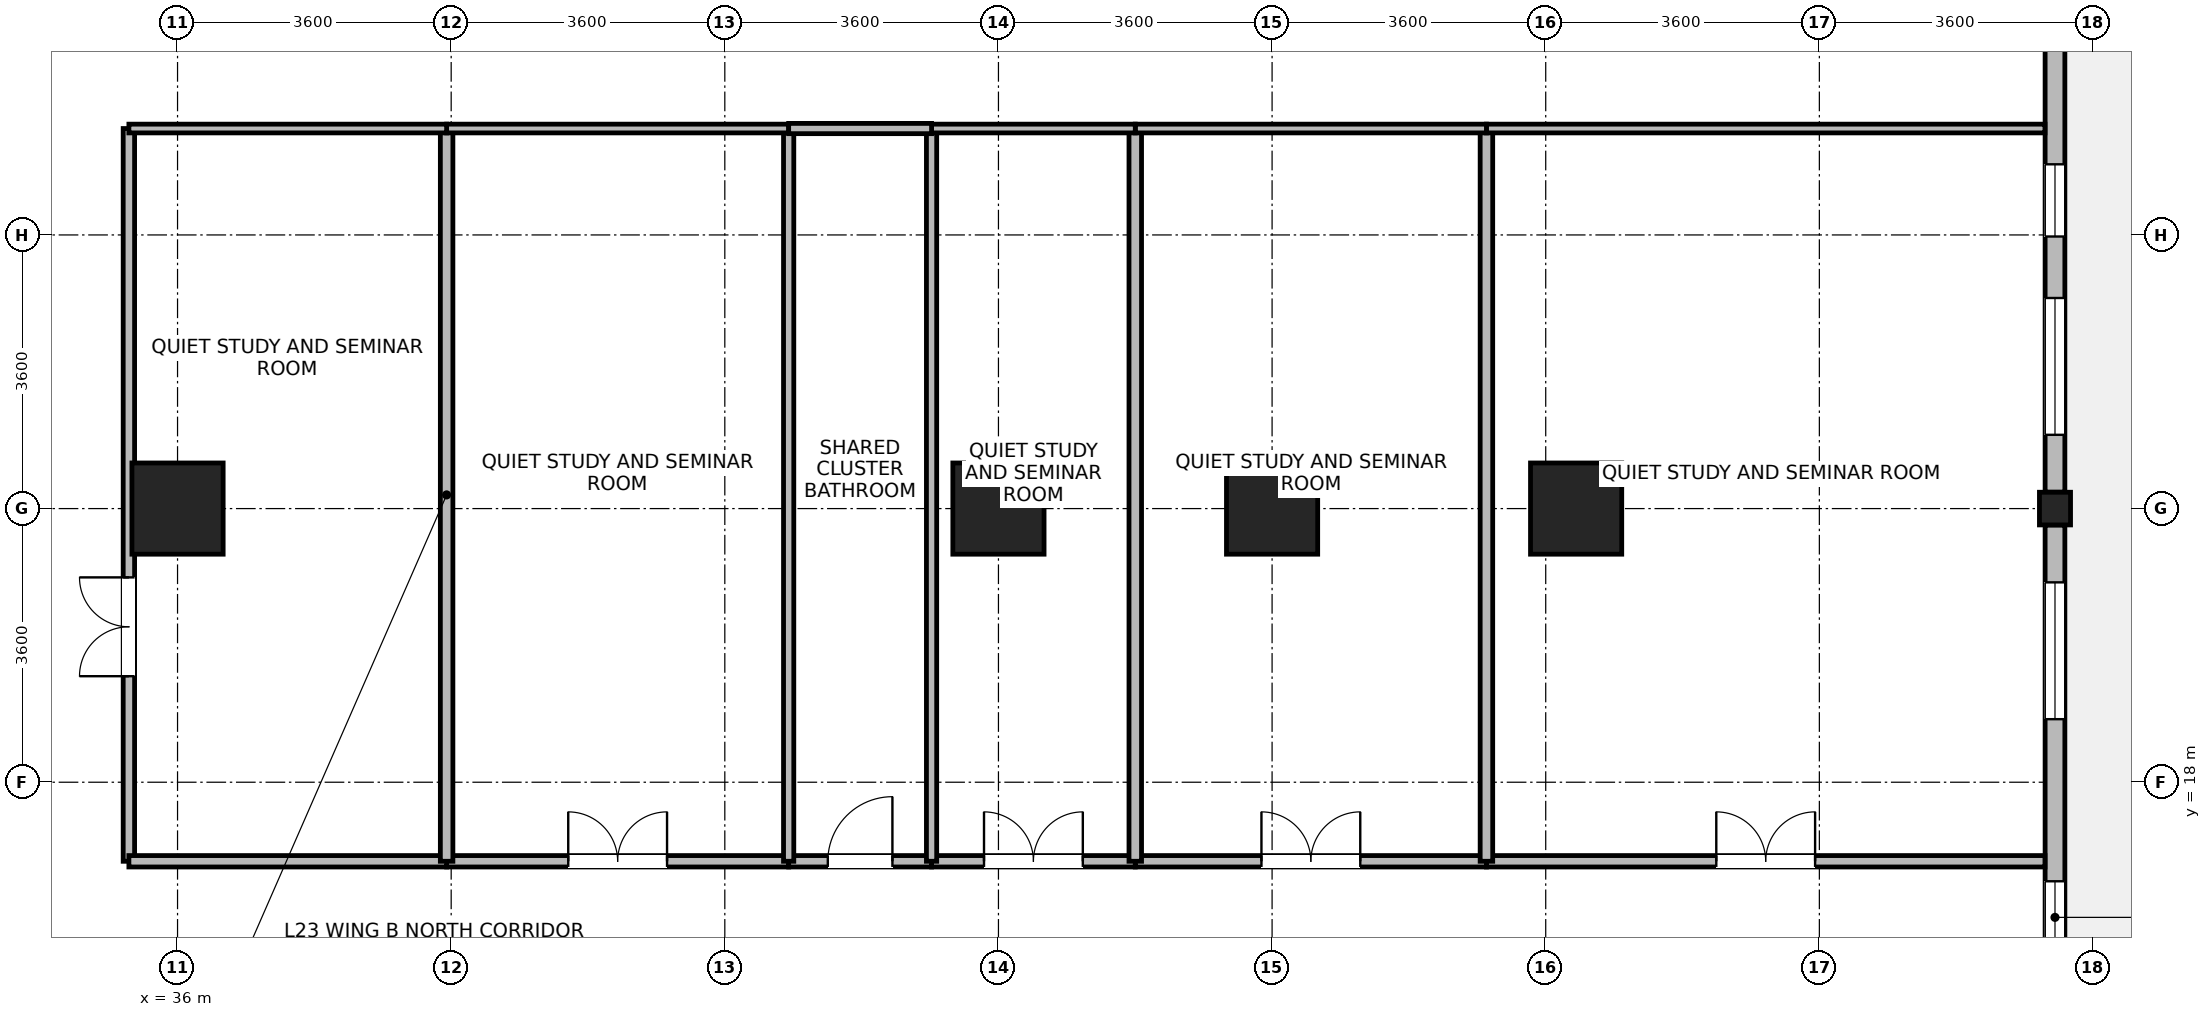
"""IFC4 building model, lengths in metres.
Left out: names, types, materials, properties, quantities, classifications, styles, units other than length and angle.
Written with IfcOpenShell. Run it as: python <this file> out.ifc"""

import sys

from ifc_helpers import new_model, si_unit, direction, frame, frame_2d, origin, origin_2d, place, context, subcontext, project, spatial, rectangle, i_section, extrude, source, transform, mapped, element, fill, save


model = new_model("IFC4")
c1 = context("Model", 3, precision=1e-05, world=origin(), true_north=direction((0.0, 1.0)))
c2 = subcontext(c1, "Body", "Model", "MODEL_VIEW")
j1 = project(units=[si_unit("LENGTHUNIT", "METRE"), si_unit("PLANEANGLEUNIT", "RADIAN")], contexts=[c1])
p1 = place(None, origin())
s1 = spatial("IfcSite", under=j1, at=p1, CompositionType="ELEMENT")
p2 = place(p1, origin())
s2 = spatial("IfcBuilding", under=s1, at=p2, CompositionType="ELEMENT")
p3 = place(p2, frame((0.0, 0.0, 93.4)))
s3 = spatial("IfcBuildingStorey", under=s2, at=p3, CompositionType="ELEMENT", Elevation=93.4)
m1 = source(origin(), c2, "Body", "SweptSolid", [
    extrude(rectangle(XDim=1.2, YDim=1.2, at=origin_2d()), origin(), (0.0, 0.0, 1.0), 3.7),
])
for number, where, z_axis, x_axis in (
    (1, (36.0, 21.6, 0.0), (0.0, 0.0, 1.0), (1.0, 0.0, 0.0)),
    (2, (46.8, 21.6, 0.0), (0.0, 0.0, 1.0), (1.0, 0.0, 0.0)),
    (3, (50.4, 21.6, 0.0), (0.0, 0.0, 1.0), (1.0, 0.0, 0.0)),
    (4, (54.4, 21.6, 0.0), (0.0, 0.0, 1.0), (1.0, 0.0, 0.0)),
):
    element("IfcColumn", number, at=place(p3, frame(where, z_axis=z_axis, x_axis=x_axis)), inside=s3, PredefinedType="COLUMN", context=c2, shape_type="MappedRepresentation", body=[
        mapped(m1, transform((0.0, 0.0, 0.0), x_axis=(1.0, 0.0, 0.0), y_axis=(0.0, 1.0, 0.0), z_axis=(0.0, 0.0, 1.0), scale=1.0)),
    ])
m2 = source(origin(), c2, "Body", "SweptSolid", [
    extrude(i_section(OverallWidth=0.409, OverallDepth=0.43, WebThickness=0.024, FlangeThickness=0.033, FilletRadius=0.015, at=origin_2d()), origin(), (0.0, 0.0, 1.0), 3.7),
])
p4 = place(p3, frame((60.7, 21.6, 0.0), z_axis=(0.0, 0.0, 1.0), x_axis=(1.0, 0.0, 0.0)))
e5 = element("IfcColumn", 5, at=p4, inside=s3, PredefinedType="COLUMN", context=c2, shape_type="MappedRepresentation", body=[
    mapped(m2, transform((0.0, 0.0, 0.0), x_axis=(1.0, 0.0, 0.0), y_axis=(0.0, 1.0, 0.0), z_axis=(0.0, 0.0, 1.0), scale=1.0)),
])
p5 = place(p3, frame((60.7, 21.384, 0.0), z_axis=(0.0, 0.0, 1.0), x_axis=(0.0, -1.0, 0.0)))
e6 = element("IfcWall", 6, at=p5, inside=s3, PredefinedType="STANDARD", context=c2, shape_type="SweptSolid", body=[
    extrude(rectangle(XDim=6.618, YDim=0.26, at=frame_2d((3.309, 0.0))), origin(), (0.0, 0.0, 1.0), 2.93),
])
p6 = place(p5, frame((0.754, 0.0, 0.85)))
e7 = element("IfcOpeningElement", 7, at=p6, cuts=e6, PredefinedType="OPENING", context=c2, shape_type="SweptSolid", body=[
    extrude(rectangle(XDim=1.8, YDim=1.85, at=frame_2d((0.9, 0.925))), frame((0.0, 0.14, 0.0), z_axis=(0.0, -1.0, 0.0), x_axis=(1.0, 0.0, 0.0)), (0.0, 0.0, 1.0), 0.28),
])
p7 = place(p5, frame((4.687, 0.0, 0.85)))
e8 = element("IfcOpeningElement", 8, at=p7, cuts=e6, PredefinedType="OPENING", context=c2, shape_type="SweptSolid", body=[
    extrude(rectangle(XDim=0.95, YDim=1.75, at=frame_2d((0.475, 0.875))), frame((0.0, 0.14, 0.0), z_axis=(0.0, -1.0, 0.0), x_axis=(1.0, 0.0, 0.0)), (0.0, 0.0, 1.0), 0.28),
])
p8 = place(p3, frame((60.7, 28.434, 0.0), z_axis=(0.0, 0.0, 1.0), x_axis=(0.0, -1.0, 0.0)))
e9 = element("IfcWall", 9, at=p8, inside=s3, PredefinedType="STANDARD", context=c2, shape_type="SweptSolid", body=[
    extrude(rectangle(XDim=6.618, YDim=0.26, at=frame_2d((3.309, 0.0))), origin(), (0.0, 0.0, 1.0), 2.93),
])
p9 = place(p8, frame((4.063, 0.0, 0.85)))
e10 = element("IfcOpeningElement", 10, at=p9, cuts=e9, PredefinedType="OPENING", context=c2, shape_type="SweptSolid", body=[
    extrude(rectangle(XDim=1.8, YDim=1.85, at=frame_2d((0.9, 0.925))), frame((0.0, 0.14, 0.0), z_axis=(0.0, -1.0, 0.0), x_axis=(1.0, 0.0, 0.0)), (0.0, 0.0, 1.0), 0.28),
])
p10 = place(p8, frame((2.305, 0.0, 0.85)))
e11 = element("IfcOpeningElement", 11, at=p10, cuts=e9, PredefinedType="OPENING", context=c2, shape_type="SweptSolid", body=[
    extrude(rectangle(XDim=0.95, YDim=1.75, at=frame_2d((0.475, 0.875))), frame((0.0, 0.14, 0.0), z_axis=(0.0, -1.0, 0.0), x_axis=(1.0, 0.0, 0.0)), (0.0, 0.0, 1.0), 0.28),
])
p11 = place(p3, frame((35.36, 16.96, 0.0), z_axis=(0.0, 0.0, 1.0), x_axis=(0.0, 1.0, 0.0)))
e12 = element("IfcWall", 12, at=p11, inside=s3, PredefinedType="PARTITIONING", context=c2, shape_type="SweptSolid", body=[
    extrude(rectangle(XDim=9.64, YDim=0.15, at=frame_2d((4.82, 0.0))), origin(), (0.0, 0.0, 1.0), 3.43),
])
p12 = place(p11, frame((2.435, 0.0, 0.0)))
e13 = element("IfcOpeningElement", 13, at=p12, cuts=e12, PredefinedType="OPENING", context=c2, shape_type="SweptSolid", body=[
    extrude(rectangle(XDim=1.3, YDim=2.12, at=frame_2d((0.65, 1.06))), frame((0.0, 0.085, 0.0), z_axis=(0.0, -1.0, 0.0), x_axis=(1.0, 0.0, 0.0)), (0.0, 0.0, 1.0), 0.17),
])
p13 = place(p3, frame((53.22, 16.96, 0.0), z_axis=(0.0, 0.0, 1.0), x_axis=(1.0, 0.0, 0.0)))
e14 = element("IfcWall", 14, at=p13, inside=s3, PredefinedType="PARTITIONING", context=c2, shape_type="SweptSolid", body=[
    extrude(rectangle(XDim=7.348, YDim=0.15, at=frame_2d((3.674, 0.0))), origin(), (0.0, 0.0, 1.0), 3.43),
])
p14 = place(p13, frame((3.024, 0.0, 0.0)))
e15 = element("IfcOpeningElement", 15, at=p14, cuts=e14, PredefinedType="OPENING", context=c2, shape_type="SweptSolid", body=[
    extrude(rectangle(XDim=1.3, YDim=2.12, at=frame_2d((0.65, 1.06))), frame((0.0, 0.085, 0.0), z_axis=(0.0, -1.0, 0.0), x_axis=(1.0, 0.0, 0.0)), (0.0, 0.0, 1.0), 0.17),
])
p15 = place(p3, frame((48.6, 16.96, 0.0), z_axis=(0.0, 0.0, 1.0), x_axis=(1.0, 0.0, 0.0)))
e16 = element("IfcWall", 16, at=p15, inside=s3, PredefinedType="PARTITIONING", context=c2, shape_type="SweptSolid", body=[
    extrude(rectangle(XDim=4.62, YDim=0.15, at=frame_2d((2.31, 0.0))), origin(), (0.0, 0.0, 1.0), 3.43),
])
p16 = place(p15, frame((1.66, 0.0, 0.0)))
e17 = element("IfcOpeningElement", 17, at=p16, cuts=e16, PredefinedType="OPENING", context=c2, shape_type="SweptSolid", body=[
    extrude(rectangle(XDim=1.3, YDim=2.12, at=frame_2d((0.65, 1.06))), frame((0.0, 0.085, 0.0), z_axis=(0.0, -1.0, 0.0), x_axis=(1.0, 0.0, 0.0)), (0.0, 0.0, 1.0), 0.17),
])
p17 = place(p3, frame((39.54, 16.96, 0.0), z_axis=(0.0, 0.0, 1.0), x_axis=(1.0, 0.0, 0.0)))
e18 = element("IfcWall", 18, at=p17, inside=s3, PredefinedType="PARTITIONING", context=c2, shape_type="SweptSolid", body=[
    extrude(rectangle(XDim=4.5, YDim=0.15, at=frame_2d((2.25, 0.0))), origin(), (0.0, 0.0, 1.0), 3.43),
])
p18 = place(p17, frame((1.6, 0.0, 0.0)))
e19 = element("IfcOpeningElement", 19, at=p18, cuts=e18, PredefinedType="OPENING", context=c2, shape_type="SweptSolid", body=[
    extrude(rectangle(XDim=1.3, YDim=2.12, at=frame_2d((0.65, 1.06))), frame((0.0, 0.085, 0.0), z_axis=(0.0, -1.0, 0.0), x_axis=(1.0, 0.0, 0.0)), (0.0, 0.0, 1.0), 0.17),
])
p19 = place(p3, frame((35.36, 16.96, 0.0), z_axis=(0.0, 0.0, 1.0), x_axis=(1.0, 0.0, 0.0)))
e20 = element("IfcWall", 20, at=p19, inside=s3, PredefinedType="PARTITIONING", context=c2, shape_type="SweptSolid", body=[
    extrude(rectangle(XDim=4.18, YDim=0.15, at=frame_2d((2.09, 0.0))), origin(), (0.0, 0.0, 1.0), 3.43),
])
p20 = place(p3, frame((45.92, 16.96, 0.0), z_axis=(0.0, 0.0, 1.0), x_axis=(1.0, 0.0, 0.0)))
e21 = element("IfcWall", 21, at=p20, inside=s3, PredefinedType="PARTITIONING", context=c2, shape_type="SweptSolid", body=[
    extrude(rectangle(XDim=2.68, YDim=0.15, at=frame_2d((1.34, 0.0))), origin(), (0.0, 0.0, 1.0), 3.43),
])
p21 = place(p20, frame((0.69, 0.0, 0.0)))
e22 = element("IfcOpeningElement", 22, at=p21, cuts=e21, PredefinedType="OPENING", context=c2, shape_type="SweptSolid", body=[
    extrude(rectangle(XDim=1.3, YDim=2.12, at=frame_2d((0.65, 1.06))), frame((0.0, 0.085, 0.0), z_axis=(0.0, -1.0, 0.0), x_axis=(1.0, 0.0, 0.0)), (0.0, 0.0, 1.0), 0.17),
])
p22 = place(p3, frame((44.04, 16.96, 0.0), z_axis=(0.0, 0.0, 1.0), x_axis=(1.0, 0.0, 0.0)))
e23 = element("IfcWall", 23, at=p22, inside=s3, PredefinedType="PARTITIONING", context=c2, shape_type="SweptSolid", body=[
    extrude(rectangle(XDim=1.88, YDim=0.15, at=frame_2d((0.94, 0.0))), origin(), (0.0, 0.0, 1.0), 3.43),
])
p23 = place(p22, frame((0.515, 0.0, 0.0)))
e24 = element("IfcOpeningElement", 24, at=p23, cuts=e23, PredefinedType="OPENING", context=c2, shape_type="SweptSolid", body=[
    extrude(rectangle(XDim=0.85, YDim=2.04, at=frame_2d((0.425, 1.02))), frame((0.0, 0.085, 0.0), z_axis=(0.0, -1.0, 0.0), x_axis=(1.0, 0.0, 0.0)), (0.0, 0.0, 1.0), 0.17),
])
p24 = place(p3, frame((39.54, 16.96, 0.0), z_axis=(0.0, 0.0, 1.0), x_axis=(0.0, 1.0, 0.0)))
e25 = element("IfcWall", 25, at=p24, inside=s3, PredefinedType="PARTITIONING", context=c2, shape_type="SweptSolid", body=[
    extrude(rectangle(XDim=9.64, YDim=0.165, at=frame_2d((4.82, 0.0))), origin(), (0.0, 0.0, 1.0), 3.43),
])
for number, where, z_axis, x_axis in (
    (26, (44.04, 16.96, 0.0), (0.0, 0.0, 1.0), (0.0, 1.0, 0.0)),
    (27, (45.92, 16.96, 0.0), (0.0, 0.0, 1.0), (0.0, 1.0, 0.0)),
):
    element("IfcWall", number, at=place(p3, frame(where, z_axis=z_axis, x_axis=x_axis)), inside=s3, PredefinedType="PARTITIONING", context=c2, shape_type="SweptSolid", body=[
        extrude(rectangle(XDim=9.64, YDim=0.135, at=frame_2d((4.82, 0.0))), origin(), (0.0, 0.0, 1.0), 3.43),
    ])
for number, where, z_axis, x_axis in (
    (28, (48.6, 16.96, 0.0), (0.0, 0.0, 1.0), (0.0, 1.0, 0.0)),
    (29, (53.22, 16.96, 0.0), (0.0, 0.0, 1.0), (0.0, 1.0, 0.0)),
):
    element("IfcWall", number, at=place(p3, frame(where, z_axis=z_axis, x_axis=x_axis)), inside=s3, PredefinedType="PARTITIONING", context=c2, shape_type="SweptSolid", body=[
        extrude(rectangle(XDim=9.64, YDim=0.165, at=frame_2d((4.82, 0.0))), origin(), (0.0, 0.0, 1.0), 3.43),
    ])
p25 = place(p3, frame((53.22, 26.6, 0.0), z_axis=(0.0, 0.0, 1.0), x_axis=(1.0, 0.0, 0.0)))
e30 = element("IfcWall", 30, at=p25, inside=s3, PredefinedType="PARTITIONING", context=c2, shape_type="SweptSolid", body=[
    extrude(rectangle(XDim=7.348, YDim=0.115, at=frame_2d((3.674, 0.0))), origin(), (0.0, 0.0, 1.0), 3.43),
])
p26 = place(p3, frame((48.6, 26.6, 0.0), z_axis=(0.0, 0.0, 1.0), x_axis=(1.0, 0.0, 0.0)))
e31 = element("IfcWall", 31, at=p26, inside=s3, PredefinedType="PARTITIONING", context=c2, shape_type="SweptSolid", body=[
    extrude(rectangle(XDim=4.62, YDim=0.115, at=frame_2d((2.31, 0.0))), origin(), (0.0, 0.0, 1.0), 3.43),
])
p27 = place(p3, frame((39.54, 26.6, 0.0), z_axis=(0.0, 0.0, 1.0), x_axis=(1.0, 0.0, 0.0)))
e32 = element("IfcWall", 32, at=p27, inside=s3, PredefinedType="PARTITIONING", context=c2, shape_type="SweptSolid", body=[
    extrude(rectangle(XDim=4.5, YDim=0.115, at=frame_2d((2.25, 0.0))), origin(), (0.0, 0.0, 1.0), 3.43),
])
p28 = place(p3, frame((35.36, 26.6, 0.0), z_axis=(0.0, 0.0, 1.0), x_axis=(1.0, 0.0, 0.0)))
e33 = element("IfcWall", 33, at=p28, inside=s3, PredefinedType="PARTITIONING", context=c2, shape_type="SweptSolid", body=[
    extrude(rectangle(XDim=4.18, YDim=0.115, at=frame_2d((2.09, 0.0))), origin(), (0.0, 0.0, 1.0), 3.43),
])
p29 = place(p3, frame((45.92, 26.6, 0.0), z_axis=(0.0, 0.0, 1.0), x_axis=(1.0, 0.0, 0.0)))
e34 = element("IfcWall", 34, at=p29, inside=s3, PredefinedType="PARTITIONING", context=c2, shape_type="SweptSolid", body=[
    extrude(rectangle(XDim=2.68, YDim=0.115, at=frame_2d((1.34, 0.0))), origin(), (0.0, 0.0, 1.0), 3.43),
])
p30 = place(p3, frame((44.04, 26.6, 0.0), z_axis=(0.0, 0.0, 1.0), x_axis=(1.0, 0.0, 0.0)))
e35 = element("IfcWall", 35, at=p30, inside=s3, PredefinedType="PARTITIONING", context=c2, shape_type="SweptSolid", body=[
    extrude(rectangle(XDim=1.88, YDim=0.135, at=frame_2d((0.94, 0.0))), origin(), (0.0, 0.0, 1.0), 3.43),
])
p31 = place(p6, origin())
e36 = element("IfcWindow", 36, at=p31, inside=s3, PartitioningType="SINGLE_PANEL", PredefinedType="WINDOW", context=c2, shape_type="SweptSolid", body=[
    extrude(rectangle(XDim=1.8, YDim=1.85, at=frame_2d((0.9, 0.925))), frame((0.0, 0.03, 0.0), z_axis=(0.0, -1.0, 0.0), x_axis=(1.0, 0.0, 0.0)), (0.0, 0.0, 1.0), 0.06),
])
fill(e7, e36)
p32 = place(p7, origin())
e37 = element("IfcWindow", 37, at=p32, inside=s3, PartitioningType="SINGLE_PANEL", PredefinedType="WINDOW", context=c2, shape_type="SweptSolid", body=[
    extrude(rectangle(XDim=0.95, YDim=1.75, at=frame_2d((0.475, 0.875))), frame((0.0, 0.03, 0.0), z_axis=(0.0, -1.0, 0.0), x_axis=(1.0, 0.0, 0.0)), (0.0, 0.0, 1.0), 0.06),
])
fill(e8, e37)
p33 = place(p9, origin())
e38 = element("IfcWindow", 38, at=p33, inside=s3, PartitioningType="SINGLE_PANEL", PredefinedType="WINDOW", context=c2, shape_type="SweptSolid", body=[
    extrude(rectangle(XDim=1.8, YDim=1.85, at=frame_2d((0.9, 0.925))), frame((0.0, 0.03, 0.0), z_axis=(0.0, -1.0, 0.0), x_axis=(1.0, 0.0, 0.0)), (0.0, 0.0, 1.0), 0.06),
])
fill(e10, e38)
p34 = place(p10, origin())
e39 = element("IfcWindow", 39, at=p34, inside=s3, PartitioningType="SINGLE_PANEL", PredefinedType="WINDOW", context=c2, shape_type="SweptSolid", body=[
    extrude(rectangle(XDim=0.95, YDim=1.75, at=frame_2d((0.475, 0.875))), frame((0.0, 0.03, 0.0), z_axis=(0.0, -1.0, 0.0), x_axis=(1.0, 0.0, 0.0)), (0.0, 0.0, 1.0), 0.06),
])
fill(e11, e39)
p35 = place(p12, origin())
e40 = element("IfcDoor", 40, at=p35, inside=s3, OperationType="DOUBLE_DOOR_SINGLE_SWING", PredefinedType="DOOR", context=c2, shape_type="SweptSolid", body=[
    extrude(rectangle(XDim=1.3, YDim=2.12, at=frame_2d((0.65, 1.06))), frame((0.0, 0.025, 0.0), z_axis=(0.0, -1.0, 0.0), x_axis=(1.0, 0.0, 0.0)), (0.0, 0.0, 1.0), 0.05),
])
fill(e13, e40)
p36 = place(p14, origin())
e41 = element("IfcDoor", 41, at=p36, inside=s3, OperationType="DOUBLE_DOOR_SINGLE_SWING", PredefinedType="DOOR", context=c2, shape_type="SweptSolid", body=[
    extrude(rectangle(XDim=1.3, YDim=2.12, at=frame_2d((0.65, 1.06))), frame((0.0, 0.025, 0.0), z_axis=(0.0, -1.0, 0.0), x_axis=(1.0, 0.0, 0.0)), (0.0, 0.0, 1.0), 0.05),
])
fill(e15, e41)
p37 = place(p16, origin())
e42 = element("IfcDoor", 42, at=p37, inside=s3, OperationType="DOUBLE_DOOR_SINGLE_SWING", PredefinedType="DOOR", context=c2, shape_type="SweptSolid", body=[
    extrude(rectangle(XDim=1.3, YDim=2.12, at=frame_2d((0.65, 1.06))), frame((0.0, 0.025, 0.0), z_axis=(0.0, -1.0, 0.0), x_axis=(1.0, 0.0, 0.0)), (0.0, 0.0, 1.0), 0.05),
])
fill(e17, e42)
p38 = place(p18, origin())
e43 = element("IfcDoor", 43, at=p38, inside=s3, OperationType="DOUBLE_DOOR_SINGLE_SWING", PredefinedType="DOOR", context=c2, shape_type="SweptSolid", body=[
    extrude(rectangle(XDim=1.3, YDim=2.12, at=frame_2d((0.65, 1.06))), frame((0.0, 0.025, 0.0), z_axis=(0.0, -1.0, 0.0), x_axis=(1.0, 0.0, 0.0)), (0.0, 0.0, 1.0), 0.05),
])
fill(e19, e43)
p39 = place(p21, origin())
e44 = element("IfcDoor", 44, at=p39, inside=s3, OperationType="DOUBLE_DOOR_SINGLE_SWING", PredefinedType="DOOR", context=c2, shape_type="SweptSolid", body=[
    extrude(rectangle(XDim=1.3, YDim=2.12, at=frame_2d((0.65, 1.06))), frame((0.0, 0.025, 0.0), z_axis=(0.0, -1.0, 0.0), x_axis=(1.0, 0.0, 0.0)), (0.0, 0.0, 1.0), 0.05),
])
fill(e22, e44)
p40 = place(p23, origin())
e45 = element("IfcDoor", 45, at=p40, inside=s3, OperationType="SINGLE_SWING_RIGHT", PredefinedType="DOOR", context=c2, shape_type="SweptSolid", body=[
    extrude(rectangle(XDim=0.85, YDim=2.04, at=frame_2d((0.425, 1.02))), frame((0.0, 0.025, 0.0), z_axis=(0.0, -1.0, 0.0), x_axis=(1.0, 0.0, 0.0)), (0.0, 0.0, 1.0), 0.05),
])
fill(e24, e45)
save(model, sys.argv[1])
